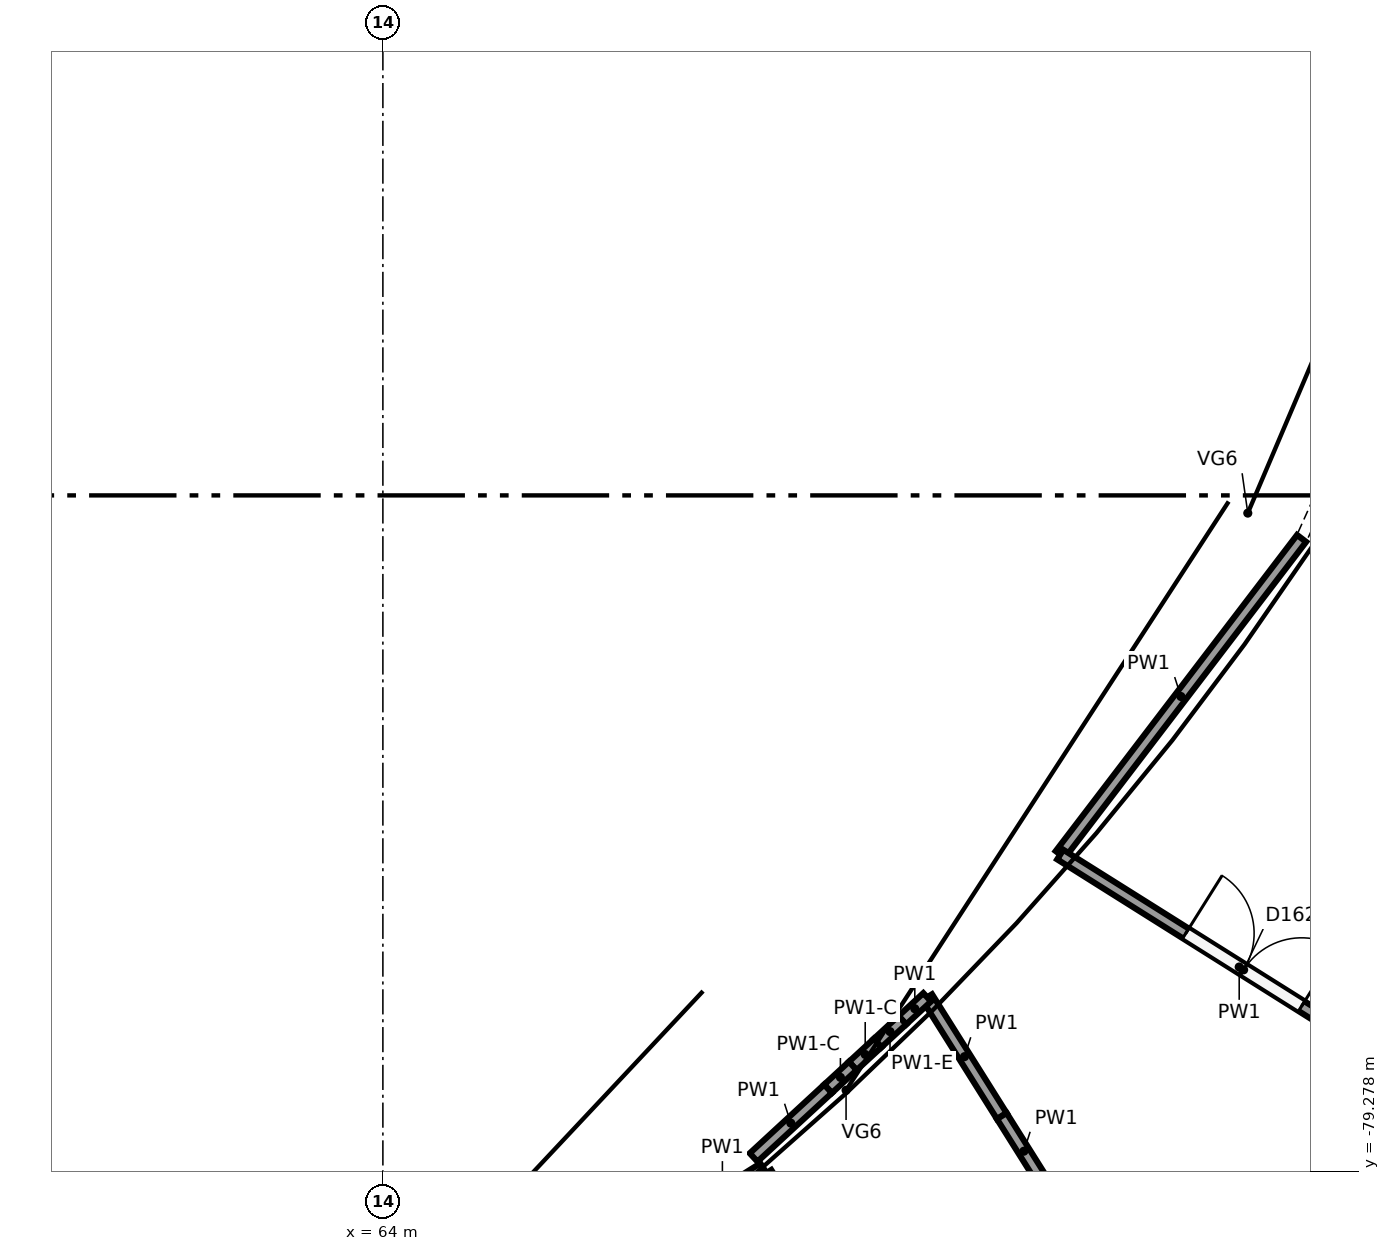
"""IFC4 building model, lengths in metres.
Left out: names, types, materials, properties, quantities, classifications, styles, units other than length and angle.
Written with IfcOpenShell. Run it as: python <this file> out.ifc"""

import sys

from ifc_helpers import new_model, si_unit, direction, frame, frame_2d, origin, origin_2d, place, context, subcontext, project, spatial, rectangle, circle, extrude, element, fill, save


model = new_model("IFC4")
c1 = context("Model", 3, precision=1e-05, world=origin(), true_north=direction((0.0, 1.0)))
c2 = subcontext(c1, "Body", "Model", "MODEL_VIEW")
j1 = project(units=[si_unit("LENGTHUNIT", "METRE"), si_unit("PLANEANGLEUNIT", "RADIAN")], contexts=[c1])
p1 = place(None, origin())
s1 = spatial("IfcSite", under=j1, at=p1, CompositionType="ELEMENT")
p2 = place(p1, origin())
s2 = spatial("IfcBuilding", under=s1, at=p2, CompositionType="ELEMENT")
p3 = place(p2, frame((0.0, 0.0, 24.0)))
s3 = spatial("IfcBuildingStorey", under=s2, at=p3, CompositionType="ELEMENT", Elevation=24.0)
p4 = place(p3, frame((72.312, -79.091, 0.0), z_axis=(0.0, 0.0, 1.0), x_axis=(1.0, 0.0, 0.0)))
e1 = element("IfcColumn", 1, at=p4, inside=s3, PredefinedType="COLUMN", context=c2, shape_type="SweptSolid", body=[
    extrude(circle(Radius=0.5, at=origin_2d()), origin(), (0.0, 0.0, 1.0), 6.0),
])
p5 = place(p3, frame((69.725, -80.381, 0.0), z_axis=(0.0, 0.0, 1.0), x_axis=(-0.532097038765, 0.846683377265, 0.0)))
e2 = element("IfcWall", 2, at=p5, inside=s3, PredefinedType="PARTITIONING", context=c2, shape_type="SweptSolid", body=[
    extrude(rectangle(XDim=1.275, YDim=0.15, at=frame_2d((0.638, 0.0))), origin(), (0.0, 0.0, 1.0), 5.4),
])
p6 = place(p3, frame((69.007, -79.238, 0.0), z_axis=(0.0, 0.0, 1.0), x_axis=(-0.846769635862, -0.531959757672, 0.0)))
e3 = element("IfcWall", 3, at=p6, inside=s3, PredefinedType="PARTITIONING", context=c2, shape_type="SweptSolid", body=[
    extrude(rectangle(XDim=1.275, YDim=0.15, at=frame_2d((0.637, 0.0))), origin(), (0.0, 0.0, 1.0), 5.4),
])
p7 = place(p3, frame((72.143, -78.552, 0.0), z_axis=(0.0, 0.0, 1.0), x_axis=(-0.53205501577, 0.846709785106, 0.0)))
e4 = element("IfcWall", 4, at=p7, inside=s3, PredefinedType="PARTITIONING", context=c2, shape_type="SweptSolid", body=[
    extrude(rectangle(XDim=1.845, YDim=0.15, at=frame_2d((0.922, 0.0))), origin(), (0.0, 0.0, 1.0), 5.4),
])
p8 = place(p3, frame((71.162, -76.99, 0.0), z_axis=(0.0, 0.0, 1.0), x_axis=(-0.735119559596, -0.677937484654, 0.0)))
e5 = element("IfcWall", 5, at=p8, inside=s3, PredefinedType="PARTITIONING", context=c2, shape_type="SweptSolid", body=[
    extrude(rectangle(XDim=0.444, YDim=0.15, at=frame_2d((0.222, 0.0))), origin(), (0.0, 0.0, 1.0), 5.4),
])
p9 = place(p3, frame((70.835, -77.291, 0.0), z_axis=(0.0, 0.0, 1.0), x_axis=(-0.735140890353, -0.677914353979, 0.0)))
e6 = element("IfcWall", 6, at=p9, inside=s3, PredefinedType="PARTITIONING", context=c2, shape_type="SweptSolid", body=[
    extrude(rectangle(XDim=0.444, YDim=0.15, at=frame_2d((0.222, 0.0))), origin(), (0.0, 0.0, 1.0), 2.465),
])
for number, where, z_axis, x_axis in (
    (7, (70.509, -77.592, 0.0), (0.0, 0.0, 1.0), (-0.735, -0.678, 0.0)),
    (8, (70.183, -77.893, 0.0), (0.0, 0.0, 1.0), (-0.735, -0.678, 0.0)),
):
    element("IfcWall", number, at=place(p3, frame(where, z_axis=z_axis, x_axis=x_axis)), inside=s3, PredefinedType="PARTITIONING", context=c2, shape_type="SweptSolid", body=[
        extrude(rectangle(XDim=0.444, YDim=0.15, at=frame_2d((0.222, 0.0))), origin(), (0.0, 0.0, 1.0), 2.381),
    ])
p10 = place(p3, frame((69.857, -78.194, 0.0), z_axis=(0.0, 0.0, 1.0), x_axis=(-0.735035309116, -0.67802883003, 0.0)))
e9 = element("IfcWall", 9, at=p10, inside=s3, PredefinedType="PARTITIONING", context=c2, shape_type="SweptSolid", body=[
    extrude(rectangle(XDim=1.332, YDim=0.15, at=frame_2d((0.666, 0.0))), origin(), (0.0, 0.0, 1.0), 5.4),
])
p11 = place(p3, frame((72.725, -79.477, 0.0), z_axis=(0.0, 0.0, 1.0), x_axis=(-0.532066281882, 0.846702705608, 0.0)))
e10 = element("IfcWall", 10, at=p11, inside=s3, PredefinedType="PARTITIONING", context=c2, shape_type="SweptSolid", body=[
    extrude(rectangle(XDim=1.093, YDim=0.15, at=frame_2d((0.546, 0.0))), origin(), (0.0, 0.0, 1.0), 5.4),
])
p12 = place(p3, frame((79.145, -64.175, 0.0), z_axis=(0.0, 0.0, 1.0), x_axis=(-0.411198704288, -0.911545734229, 0.0)))
e11 = element("IfcWall", 11, at=p12, inside=s3, PredefinedType="PARTITIONING", context=c2, shape_type="SweptSolid", body=[
    extrude(rectangle(XDim=7.435, YDim=0.15, at=frame_2d((3.718, 0.0))), origin(), (0.0, 0.0, 1.0), 5.4),
])
p13 = place(p3, frame((76.087, -70.953, 0.0), z_axis=(0.0, 0.0, 1.0), x_axis=(-0.606793573824, -0.794859458499, 0.0)))
e12 = element("IfcWall", 12, at=p13, inside=s3, PredefinedType="PARTITIONING", context=c2, shape_type="SweptSolid", body=[
    extrude(rectangle(XDim=5.233, YDim=0.15, at=frame_2d((2.616, 0.0))), origin(), (0.0, 0.0, 1.0), 5.4),
])
p14 = place(p3, frame((72.912, -75.112, 0.0), z_axis=(0.0, 0.0, 1.0), x_axis=(0.846713394786, -0.532049271299, 0.0)))
e13 = element("IfcWall", 13, at=p14, inside=s3, PredefinedType="PARTITIONING", context=c2, shape_type="SweptSolid", body=[
    extrude(rectangle(XDim=5.562, YDim=0.15, at=frame_2d((2.781, 0.0))), origin(), (0.0, 0.0, 1.0), 5.4),
])
p15 = place(p14, frame((1.95, 0.0, 0.0)))
e14 = element("IfcOpeningElement", 14, at=p15, cuts=e13, PredefinedType="OPENING", context=c2, shape_type="SweptSolid", body=[
    extrude(rectangle(XDim=1.8, YDim=2.1, at=frame_2d((0.9, 1.05))), frame((0.0, 0.085, 0.0), z_axis=(0.0, -1.0, 0.0), x_axis=(1.0, 0.0, 0.0)), (0.0, 0.0, 1.0), 0.17),
])
p16 = place(p15, origin())
e15 = element("IfcDoor", 15, at=p16, inside=s3, OperationType="DOUBLE_DOOR_SINGLE_SWING", PredefinedType="DOOR", context=c2, shape_type="SweptSolid", body=[
    extrude(rectangle(XDim=1.8, YDim=2.1, at=frame_2d((0.9, 1.05))), frame((0.0, 0.025, 0.0), z_axis=(0.0, -1.0, 0.0), x_axis=(1.0, 0.0, 0.0)), (0.0, 0.0, 1.0), 0.05),
])
fill(e14, e15)
save(model, sys.argv[1])
